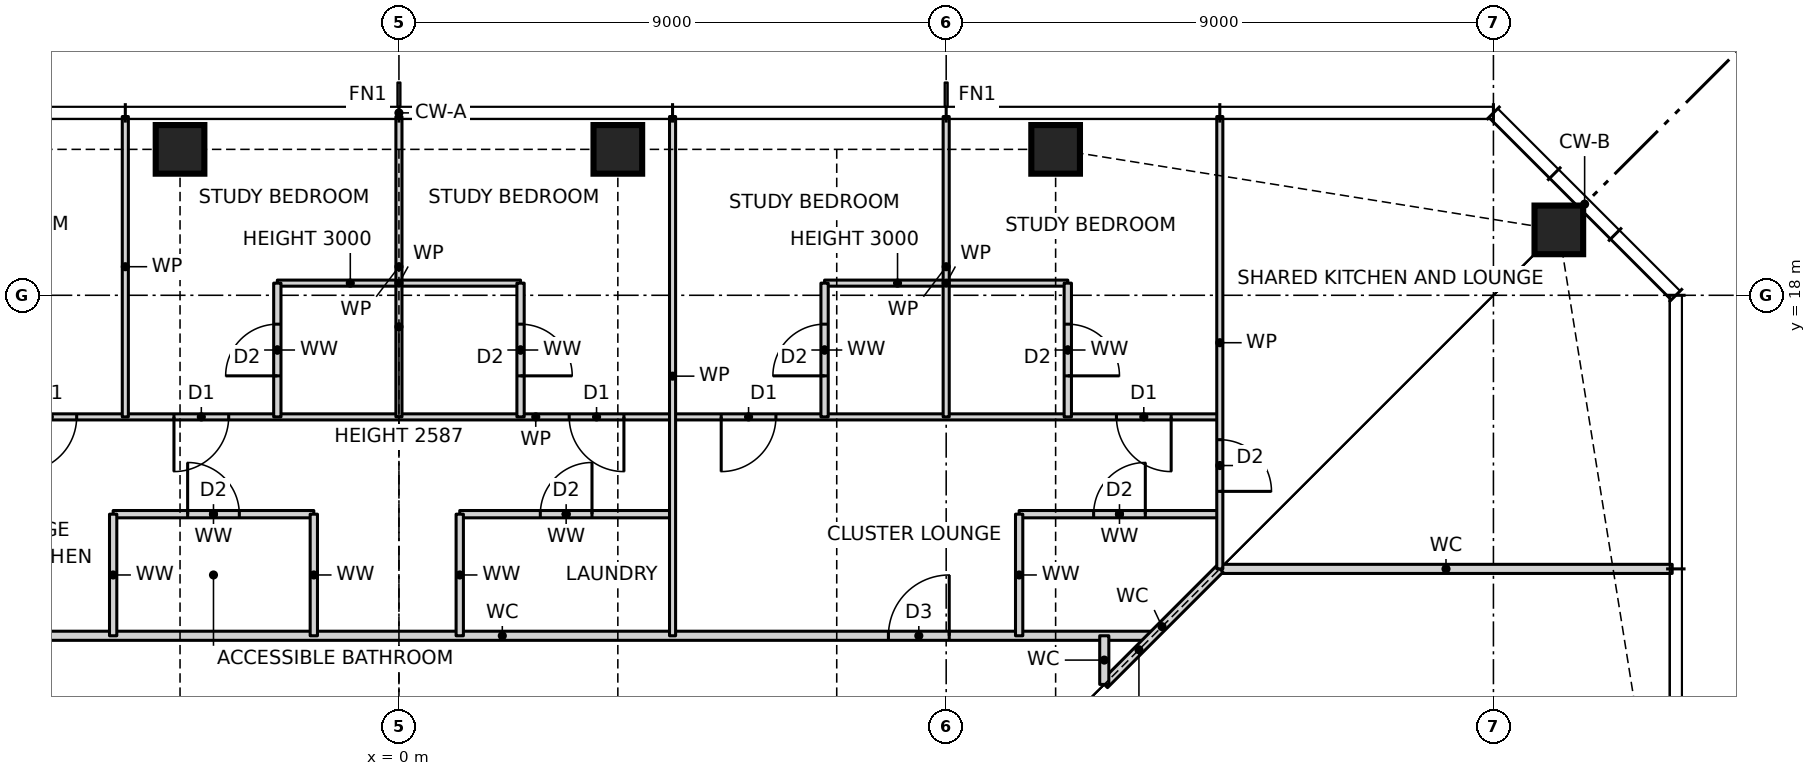
"""IFC4 building model, lengths in metres.
Left out: names, types, materials, properties, quantities, classifications, styles, units other than length and angle.
Written with IfcOpenShell. Run it as: python <this file> out.ifc"""

import sys

from ifc_helpers import new_model, si_unit, direction, frame, frame_2d, origin, origin_2d, place, context, subcontext, project, spatial, rectangle, hollow_rectangle, extrude, element, fill, save


model = new_model("IFC4")
c1 = context("Model", 3, precision=1e-05, world=origin(), true_north=direction((0.0, 1.0)))
c2 = subcontext(c1, "Body", "Model", "MODEL_VIEW")
j1 = project(units=[si_unit("LENGTHUNIT", "METRE"), si_unit("PLANEANGLEUNIT", "RADIAN")], contexts=[c1])
p1 = place(None, origin())
s1 = spatial("IfcSite", under=j1, at=p1, CompositionType="ELEMENT")
p2 = place(p1, origin())
s2 = spatial("IfcBuilding", under=s1, at=p2, CompositionType="ELEMENT")
p3 = place(p2, frame((0.0, 0.0, 122.5)))
s3 = spatial("IfcBuildingStorey", under=s2, at=p3, CompositionType="ELEMENT", Elevation=122.5)
for number, where, z_axis, x_axis in (
    (1, (19.076, 19.076, 0.0), (0.0, 0.0, 1.0), (1.0, 0.0, 0.0)),
    (2, (10.8, 20.4, 0.0), (0.0, 0.0, 1.0), (1.0, 0.0, 0.0)),
    (3, (3.6, 20.4, 0.0), (0.0, 0.0, 1.0), (1.0, 0.0, 0.0)),
    (4, (-3.6, 20.4, 0.0), (0.0, 0.0, 1.0), (1.0, 0.0, 0.0)),
):
    element("IfcColumn", number, at=place(p3, frame(where, z_axis=z_axis, x_axis=x_axis)), inside=s3, PredefinedType="COLUMN", context=c2, shape_type="SweptSolid", body=[
        extrude(hollow_rectangle(XDim=0.8, YDim=0.8, WallThickness=0.07, at=origin_2d()), origin(), (0.0, 0.0, 1.0), 3.5),
    ])
p4 = place(p3, frame((-9.0, 12.4, 0.0), z_axis=(0.0, 0.0, 1.0), x_axis=(1.0, 0.0, 0.0)))
e5 = element("IfcWall", 5, at=p4, inside=s3, PredefinedType="PARTITIONING", context=c2, shape_type="SweptSolid", body=[
    extrude(rectangle(XDim=21.4, YDim=0.15, at=frame_2d((10.7, 0.0))), origin(), (0.0, 0.0, 1.0), 3.27),
])
p5 = place(p4, frame((17.05, 0.0, 0.0)))
e6 = element("IfcOpeningElement", 6, at=p5, cuts=e5, PredefinedType="OPENING", context=c2, shape_type="SweptSolid", body=[
    extrude(rectangle(XDim=1.0, YDim=2.1, at=frame_2d((0.5, 1.05))), frame((0.0, 0.085, 0.0), z_axis=(0.0, -1.0, 0.0), x_axis=(1.0, 0.0, 0.0)), (0.0, 0.0, 1.0), 0.17),
])
p6 = place(p4, frame((1.65, 0.0, 0.0)))
e7 = element("IfcOpeningElement", 7, at=p6, cuts=e5, PredefinedType="OPENING", context=c2, shape_type="SweptSolid", body=[
    extrude(rectangle(XDim=1.0, YDim=2.1, at=frame_2d((0.5, 1.05))), frame((0.0, 0.085, 0.0), z_axis=(0.0, -1.0, 0.0), x_axis=(1.0, 0.0, 0.0)), (0.0, 0.0, 1.0), 0.17),
])
p7 = place(p3, frame((13.5, 13.5, 0.0), z_axis=(0.0, 0.0, 1.0), x_axis=(1.0, 0.0, 0.0)))
e8 = element("IfcWall", 8, at=p7, inside=s3, PredefinedType="PARTITIONING", context=c2, shape_type="SweptSolid", body=[
    extrude(rectangle(XDim=7.44, YDim=0.15, at=frame_2d((3.72, 0.0))), origin(), (0.0, 0.0, 1.0), 3.27),
])
p8 = place(p3, frame((-4.7, 14.4, 0.0), z_axis=(0.0, 0.0, 1.0), x_axis=(1.0, 0.0, 0.0)))
e9 = element("IfcWall", 9, at=p8, inside=s3, PredefinedType="PARTITIONING", context=c2, shape_type="SweptSolid", body=[
    extrude(rectangle(XDim=3.3, YDim=0.12, at=frame_2d((1.65, 0.0))), origin(), (0.0, 0.0, 1.0), 3.27),
])
p9 = place(p8, frame((1.225, 0.0, 0.0)))
e10 = element("IfcOpeningElement", 10, at=p9, cuts=e9, PredefinedType="OPENING", context=c2, shape_type="SweptSolid", body=[
    extrude(rectangle(XDim=0.85, YDim=2.1, at=frame_2d((0.425, 1.05))), frame((0.0, 0.07, 0.0), z_axis=(0.0, -1.0, 0.0), x_axis=(1.0, 0.0, 0.0)), (0.0, 0.0, 1.0), 0.14),
])
p10 = place(p3, frame((1.0, 14.4, 0.0), z_axis=(0.0, 0.0, 1.0), x_axis=(1.0, 0.0, 0.0)))
e11 = element("IfcWall", 11, at=p10, inside=s3, PredefinedType="PARTITIONING", context=c2, shape_type="SweptSolid", body=[
    extrude(rectangle(XDim=3.5, YDim=0.12, at=frame_2d((1.75, 0.0))), origin(), (0.0, 0.0, 1.0), 3.27),
])
p11 = place(p10, frame((1.325, 0.0, 0.0)))
e12 = element("IfcOpeningElement", 12, at=p11, cuts=e11, PredefinedType="OPENING", context=c2, shape_type="SweptSolid", body=[
    extrude(rectangle(XDim=0.85, YDim=2.1, at=frame_2d((0.425, 1.05))), frame((0.0, 0.07, 0.0), z_axis=(0.0, -1.0, 0.0), x_axis=(1.0, 0.0, 0.0)), (0.0, 0.0, 1.0), 0.14),
])
p12 = place(p3, frame((10.2, 14.4, 0.0), z_axis=(0.0, 0.0, 1.0), x_axis=(1.0, 0.0, 0.0)))
e13 = element("IfcWall", 13, at=p12, inside=s3, PredefinedType="PARTITIONING", context=c2, shape_type="SweptSolid", body=[
    extrude(rectangle(XDim=3.3, YDim=0.12, at=frame_2d((1.65, 0.0))), origin(), (0.0, 0.0, 1.0), 3.27),
])
p13 = place(p12, frame((1.225, 0.0, 0.0)))
e14 = element("IfcOpeningElement", 14, at=p13, cuts=e13, PredefinedType="OPENING", context=c2, shape_type="SweptSolid", body=[
    extrude(rectangle(XDim=0.85, YDim=2.1, at=frame_2d((0.425, 1.05))), frame((0.0, 0.07, 0.0), z_axis=(0.0, -1.0, 0.0), x_axis=(1.0, 0.0, 0.0)), (0.0, 0.0, 1.0), 0.14),
])
p14 = place(p3, frame((-9.0, 16.0, 0.0), z_axis=(0.0, 0.0, 1.0), x_axis=(1.0, 0.0, 0.0)))
e15 = element("IfcWall", 15, at=p14, inside=s3, PredefinedType="PARTITIONING", context=c2, shape_type="SweptSolid", body=[
    extrude(rectangle(XDim=22.5, YDim=0.1, at=frame_2d((11.25, 0.0))), origin(), (0.0, 0.0, 1.0), 3.27),
])
p15 = place(p14, frame((20.8, 0.0, 0.0)))
e16 = element("IfcOpeningElement", 16, at=p15, cuts=e15, PredefinedType="OPENING", context=c2, shape_type="SweptSolid", body=[
    extrude(rectangle(XDim=0.9, YDim=2.1, at=frame_2d((0.45, 1.05))), frame((0.0, 0.06, 0.0), z_axis=(0.0, -1.0, 0.0), x_axis=(1.0, 0.0, 0.0)), (0.0, 0.0, 1.0), 0.12),
])
p16 = place(p14, frame((14.3, 0.0, 0.0)))
e17 = element("IfcOpeningElement", 17, at=p16, cuts=e15, PredefinedType="OPENING", context=c2, shape_type="SweptSolid", body=[
    extrude(rectangle(XDim=0.9, YDim=2.1, at=frame_2d((0.45, 1.05))), frame((0.0, 0.06, 0.0), z_axis=(0.0, -1.0, 0.0), x_axis=(1.0, 0.0, 0.0)), (0.0, 0.0, 1.0), 0.12),
])
p17 = place(p14, frame((11.8, 0.0, 0.0)))
e18 = element("IfcOpeningElement", 18, at=p17, cuts=e15, PredefinedType="OPENING", context=c2, shape_type="SweptSolid", body=[
    extrude(rectangle(XDim=0.9, YDim=2.1, at=frame_2d((0.45, 1.05))), frame((0.0, 0.06, 0.0), z_axis=(0.0, -1.0, 0.0), x_axis=(1.0, 0.0, 0.0)), (0.0, 0.0, 1.0), 0.12),
])
p18 = place(p14, frame((5.3, 0.0, 0.0)))
e19 = element("IfcOpeningElement", 19, at=p18, cuts=e15, PredefinedType="OPENING", context=c2, shape_type="SweptSolid", body=[
    extrude(rectangle(XDim=0.9, YDim=2.1, at=frame_2d((0.45, 1.05))), frame((0.0, 0.06, 0.0), z_axis=(0.0, -1.0, 0.0), x_axis=(1.0, 0.0, 0.0)), (0.0, 0.0, 1.0), 0.12),
])
p19 = place(p14, frame((2.8, 0.0, 0.0)))
e20 = element("IfcOpeningElement", 20, at=p19, cuts=e15, PredefinedType="OPENING", context=c2, shape_type="SweptSolid", body=[
    extrude(rectangle(XDim=0.9, YDim=2.1, at=frame_2d((0.45, 1.05))), frame((0.0, 0.06, 0.0), z_axis=(0.0, -1.0, 0.0), x_axis=(1.0, 0.0, 0.0)), (0.0, 0.0, 1.0), 0.12),
])
for number, where, z_axis, x_axis in (
    (21, (-2.0, 18.2, 0.0), (0.0, 0.0, 1.0), (1.0, 0.0, 0.0)),
    (22, (7.0, 18.2, 0.0), (0.0, 0.0, 1.0), (1.0, 0.0, 0.0)),
):
    element("IfcWall", number, at=place(p3, frame(where, z_axis=z_axis, x_axis=x_axis)), inside=s3, PredefinedType="PARTITIONING", context=c2, shape_type="SweptSolid", body=[
        extrude(rectangle(XDim=4.0, YDim=0.1, at=frame_2d((2.0, 0.0))), origin(), (0.0, 0.0, 1.0), 3.0),
    ])
p20 = place(p3, frame((11.6, 11.6, 0.0), z_axis=(0.0, 0.0, 1.0), x_axis=(0.707106781187, 0.707106781187, 0.0)))
e23 = element("IfcWall", 23, at=p20, inside=s3, PredefinedType="PARTITIONING", context=c2, shape_type="SweptSolid", body=[
    extrude(rectangle(XDim=2.687, YDim=0.15, at=frame_2d((1.343, 0.0))), origin(), (0.0, 0.0, 1.0), 2.343),
])
p21 = place(p3, frame((13.5, 13.5, 0.0), z_axis=(0.0, 0.0, 1.0), x_axis=(0.0, 1.0, 0.0)))
e24 = element("IfcWall", 24, at=p21, inside=s3, PredefinedType="PARTITIONING", context=c2, shape_type="SweptSolid", body=[
    extrude(rectangle(XDim=7.44, YDim=0.1, at=frame_2d((3.72, 0.0))), origin(), (0.0, 0.0, 1.0), 3.27),
])
p22 = place(p21, frame((1.275, 0.0, 0.0)))
e25 = element("IfcOpeningElement", 25, at=p22, cuts=e24, PredefinedType="OPENING", context=c2, shape_type="SweptSolid", body=[
    extrude(rectangle(XDim=0.85, YDim=2.1, at=frame_2d((0.425, 1.05))), frame((0.0, 0.06, 0.0), z_axis=(0.0, -1.0, 0.0), x_axis=(1.0, 0.0, 0.0)), (0.0, 0.0, 1.0), 0.12),
])
p23 = place(p3, frame((11.6, 11.6, 0.0), z_axis=(0.0, 0.0, 1.0), x_axis=(0.0, 1.0, 0.0)))
e26 = element("IfcWall", 26, at=p23, inside=s3, PredefinedType="PARTITIONING", context=c2, shape_type="SweptSolid", body=[
    extrude(rectangle(XDim=0.8, YDim=0.15, at=frame_2d((0.4, 0.0))), origin(), (0.0, 0.0, 1.0), 3.27),
])
p24 = place(p3, frame((11.0, 16.0, 0.0), z_axis=(0.0, 0.0, 1.0), x_axis=(0.0, 1.0, 0.0)))
e27 = element("IfcWall", 27, at=p24, inside=s3, PredefinedType="PARTITIONING", context=c2, shape_type="SweptSolid", body=[
    extrude(rectangle(XDim=2.2, YDim=0.12, at=frame_2d((1.1, 0.0))), origin(), (0.0, 0.0, 1.0), 3.27),
])
p25 = place(p24, frame((0.675, 0.0, 0.0)))
e28 = element("IfcOpeningElement", 28, at=p25, cuts=e27, PredefinedType="OPENING", context=c2, shape_type="SweptSolid", body=[
    extrude(rectangle(XDim=0.85, YDim=2.1, at=frame_2d((0.425, 1.05))), frame((0.0, 0.07, 0.0), z_axis=(0.0, -1.0, 0.0), x_axis=(1.0, 0.0, 0.0)), (0.0, 0.0, 1.0), 0.14),
])
p26 = place(p3, frame((10.2, 12.4, 0.0), z_axis=(0.0, 0.0, 1.0), x_axis=(0.0, 1.0, 0.0)))
e29 = element("IfcWall", 29, at=p26, inside=s3, PredefinedType="PARTITIONING", context=c2, shape_type="SweptSolid", body=[
    extrude(rectangle(XDim=2.0, YDim=0.12, at=frame_2d((1.0, 0.0))), origin(), (0.0, 0.0, 1.0), 3.27),
])
p27 = place(p3, frame((9.0, 16.0, 0.0), z_axis=(0.0, 0.0, 1.0), x_axis=(0.0, 1.0, 0.0)))
e30 = element("IfcWall", 30, at=p27, inside=s3, PredefinedType="PARTITIONING", context=c2, shape_type="SweptSolid", body=[
    extrude(rectangle(XDim=4.94, YDim=0.1, at=frame_2d((2.47, 0.0))), origin(), (0.0, 0.0, 1.0), 3.27),
])
p28 = place(p3, frame((7.0, 16.0, 0.0), z_axis=(0.0, 0.0, 1.0), x_axis=(0.0, 1.0, 0.0)))
e31 = element("IfcWall", 31, at=p28, inside=s3, PredefinedType="PARTITIONING", context=c2, shape_type="SweptSolid", body=[
    extrude(rectangle(XDim=2.2, YDim=0.12, at=frame_2d((1.1, 0.0))), origin(), (0.0, 0.0, 1.0), 3.27),
])
p29 = place(p28, frame((0.675, 0.0, 0.0)))
e32 = element("IfcOpeningElement", 32, at=p29, cuts=e31, PredefinedType="OPENING", context=c2, shape_type="SweptSolid", body=[
    extrude(rectangle(XDim=0.85, YDim=2.1, at=frame_2d((0.425, 1.05))), frame((0.0, 0.07, 0.0), z_axis=(0.0, -1.0, 0.0), x_axis=(1.0, 0.0, 0.0)), (0.0, 0.0, 1.0), 0.14),
])
p30 = place(p3, frame((4.5, 12.4, 0.0), z_axis=(0.0, 0.0, 1.0), x_axis=(0.0, 1.0, 0.0)))
e33 = element("IfcWall", 33, at=p30, inside=s3, PredefinedType="PARTITIONING", context=c2, shape_type="SweptSolid", body=[
    extrude(rectangle(XDim=8.54, YDim=0.1, at=frame_2d((4.27, 0.0))), origin(), (0.0, 0.0, 1.0), 3.27),
])
p31 = place(p3, frame((2.0, 16.0, 0.0), z_axis=(0.0, 0.0, 1.0), x_axis=(0.0, 1.0, 0.0)))
e34 = element("IfcWall", 34, at=p31, inside=s3, PredefinedType="PARTITIONING", context=c2, shape_type="SweptSolid", body=[
    extrude(rectangle(XDim=2.2, YDim=0.12, at=frame_2d((1.1, 0.0))), origin(), (0.0, 0.0, 1.0), 3.27),
])
p32 = place(p31, frame((0.675, 0.0, 0.0)))
e35 = element("IfcOpeningElement", 35, at=p32, cuts=e34, PredefinedType="OPENING", context=c2, shape_type="SweptSolid", body=[
    extrude(rectangle(XDim=0.85, YDim=2.1, at=frame_2d((0.425, 1.05))), frame((0.0, 0.07, 0.0), z_axis=(0.0, -1.0, 0.0), x_axis=(1.0, 0.0, 0.0)), (0.0, 0.0, 1.0), 0.14),
])
p33 = place(p3, frame((1.0, 12.4, 0.0), z_axis=(0.0, 0.0, 1.0), x_axis=(0.0, 1.0, 0.0)))
e36 = element("IfcWall", 36, at=p33, inside=s3, PredefinedType="PARTITIONING", context=c2, shape_type="SweptSolid", body=[
    extrude(rectangle(XDim=2.0, YDim=0.12, at=frame_2d((1.0, 0.0))), origin(), (0.0, 0.0, 1.0), 3.27),
])
p34 = place(p3, frame((0.0, 16.0, 0.0), z_axis=(0.0, 0.0, 1.0), x_axis=(0.0, 1.0, 0.0)))
e37 = element("IfcWall", 37, at=p34, inside=s3, PredefinedType="PARTITIONING", context=c2, shape_type="SweptSolid", body=[
    extrude(rectangle(XDim=4.94, YDim=0.1, at=frame_2d((2.47, 0.0))), origin(), (0.0, 0.0, 1.0), 2.587),
])
p35 = place(p3, frame((-1.4, 12.4, 0.0), z_axis=(0.0, 0.0, 1.0), x_axis=(0.0, 1.0, 0.0)))
e38 = element("IfcWall", 38, at=p35, inside=s3, PredefinedType="PARTITIONING", context=c2, shape_type="SweptSolid", body=[
    extrude(rectangle(XDim=2.0, YDim=0.12, at=frame_2d((1.0, 0.0))), origin(), (0.0, 0.0, 1.0), 3.27),
])
p36 = place(p3, frame((-2.0, 16.0, 0.0), z_axis=(0.0, 0.0, 1.0), x_axis=(0.0, 1.0, 0.0)))
e39 = element("IfcWall", 39, at=p36, inside=s3, PredefinedType="PARTITIONING", context=c2, shape_type="SweptSolid", body=[
    extrude(rectangle(XDim=2.2, YDim=0.12, at=frame_2d((1.1, 0.0))), origin(), (0.0, 0.0, 1.0), 3.27),
])
p37 = place(p36, frame((0.675, 0.0, 0.0)))
e40 = element("IfcOpeningElement", 40, at=p37, cuts=e39, PredefinedType="OPENING", context=c2, shape_type="SweptSolid", body=[
    extrude(rectangle(XDim=0.85, YDim=2.1, at=frame_2d((0.425, 1.05))), frame((0.0, 0.07, 0.0), z_axis=(0.0, -1.0, 0.0), x_axis=(1.0, 0.0, 0.0)), (0.0, 0.0, 1.0), 0.14),
])
p38 = place(p3, frame((-4.5, 16.0, 0.0), z_axis=(0.0, 0.0, 1.0), x_axis=(0.0, 1.0, 0.0)))
e41 = element("IfcWall", 41, at=p38, inside=s3, PredefinedType="PARTITIONING", context=c2, shape_type="SweptSolid", body=[
    extrude(rectangle(XDim=4.94, YDim=0.1, at=frame_2d((2.47, 0.0))), origin(), (0.0, 0.0, 1.0), 3.27),
])
p39 = place(p3, frame((-4.7, 12.4, 0.0), z_axis=(0.0, 0.0, 1.0), x_axis=(0.0, 1.0, 0.0)))
e42 = element("IfcWall", 42, at=p39, inside=s3, PredefinedType="PARTITIONING", context=c2, shape_type="SweptSolid", body=[
    extrude(rectangle(XDim=2.0, YDim=0.12, at=frame_2d((1.0, 0.0))), origin(), (0.0, 0.0, 1.0), 3.27),
])
p40 = place(p25, frame((0.85, 0.0, 0.0), z_axis=(0.0, 0.0, 1.0), x_axis=(-1.0, 0.0, 0.0)))
e43 = element("IfcDoor", 43, at=p40, inside=s3, OperationType="SINGLE_SWING_RIGHT", PredefinedType="DOOR", context=c2, shape_type="SweptSolid", body=[
    extrude(rectangle(XDim=0.85, YDim=2.1, at=frame_2d((0.425, 1.05))), frame((0.0, 0.025, 0.0), z_axis=(0.0, -1.0, 0.0), x_axis=(1.0, 0.0, 0.0)), (0.0, 0.0, 1.0), 0.05),
])
fill(e28, e43)
p41 = place(p15, frame((0.9, 0.0, 0.0), z_axis=(0.0, 0.0, 1.0), x_axis=(-1.0, 0.0, 0.0)))
e44 = element("IfcDoor", 44, at=p41, inside=s3, OperationType="SINGLE_SWING_LEFT", PredefinedType="DOOR", context=c2, shape_type="SweptSolid", body=[
    extrude(rectangle(XDim=0.9, YDim=2.1, at=frame_2d((0.45, 1.05))), frame((0.0, 0.025, 0.0), z_axis=(0.0, -1.0, 0.0), x_axis=(1.0, 0.0, 0.0)), (0.0, 0.0, 1.0), 0.05),
])
fill(e16, e44)
p42 = place(p29, origin())
e45 = element("IfcDoor", 45, at=p42, inside=s3, OperationType="SINGLE_SWING_LEFT", PredefinedType="DOOR", context=c2, shape_type="SweptSolid", body=[
    extrude(rectangle(XDim=0.85, YDim=2.1, at=frame_2d((0.425, 1.05))), frame((0.0, 0.025, 0.0), z_axis=(0.0, -1.0, 0.0), x_axis=(1.0, 0.0, 0.0)), (0.0, 0.0, 1.0), 0.05),
])
fill(e32, e45)
p43 = place(p16, frame((0.9, 0.0, 0.0), z_axis=(0.0, 0.0, 1.0), x_axis=(-1.0, 0.0, 0.0)))
e46 = element("IfcDoor", 46, at=p43, inside=s3, OperationType="SINGLE_SWING_RIGHT", PredefinedType="DOOR", context=c2, shape_type="SweptSolid", body=[
    extrude(rectangle(XDim=0.9, YDim=2.1, at=frame_2d((0.45, 1.05))), frame((0.0, 0.025, 0.0), z_axis=(0.0, -1.0, 0.0), x_axis=(1.0, 0.0, 0.0)), (0.0, 0.0, 1.0), 0.05),
])
fill(e17, e46)
p44 = place(p5, origin())
e47 = element("IfcDoor", 47, at=p44, inside=s3, OperationType="SINGLE_SWING_RIGHT", PredefinedType="DOOR", context=c2, shape_type="SweptSolid", body=[
    extrude(rectangle(XDim=1.0, YDim=2.1, at=frame_2d((0.5, 1.05))), frame((0.0, 0.025, 0.0), z_axis=(0.0, -1.0, 0.0), x_axis=(1.0, 0.0, 0.0)), (0.0, 0.0, 1.0), 0.05),
])
fill(e6, e47)
p45 = place(p13, origin())
e48 = element("IfcDoor", 48, at=p45, inside=s3, OperationType="SINGLE_SWING_RIGHT", PredefinedType="DOOR", context=c2, shape_type="SweptSolid", body=[
    extrude(rectangle(XDim=0.85, YDim=2.1, at=frame_2d((0.425, 1.05))), frame((0.0, 0.025, 0.0), z_axis=(0.0, -1.0, 0.0), x_axis=(1.0, 0.0, 0.0)), (0.0, 0.0, 1.0), 0.05),
])
fill(e14, e48)
p46 = place(p32, frame((0.85, 0.0, 0.0), z_axis=(0.0, 0.0, 1.0), x_axis=(-1.0, 0.0, 0.0)))
e49 = element("IfcDoor", 49, at=p46, inside=s3, OperationType="SINGLE_SWING_RIGHT", PredefinedType="DOOR", context=c2, shape_type="SweptSolid", body=[
    extrude(rectangle(XDim=0.85, YDim=2.1, at=frame_2d((0.425, 1.05))), frame((0.0, 0.025, 0.0), z_axis=(0.0, -1.0, 0.0), x_axis=(1.0, 0.0, 0.0)), (0.0, 0.0, 1.0), 0.05),
])
fill(e35, e49)
p47 = place(p17, frame((0.9, 0.0, 0.0), z_axis=(0.0, 0.0, 1.0), x_axis=(-1.0, 0.0, 0.0)))
e50 = element("IfcDoor", 50, at=p47, inside=s3, OperationType="SINGLE_SWING_LEFT", PredefinedType="DOOR", context=c2, shape_type="SweptSolid", body=[
    extrude(rectangle(XDim=0.9, YDim=2.1, at=frame_2d((0.45, 1.05))), frame((0.0, 0.025, 0.0), z_axis=(0.0, -1.0, 0.0), x_axis=(1.0, 0.0, 0.0)), (0.0, 0.0, 1.0), 0.05),
])
fill(e18, e50)
p48 = place(p37, origin())
e51 = element("IfcDoor", 51, at=p48, inside=s3, OperationType="SINGLE_SWING_LEFT", PredefinedType="DOOR", context=c2, shape_type="SweptSolid", body=[
    extrude(rectangle(XDim=0.85, YDim=2.1, at=frame_2d((0.425, 1.05))), frame((0.0, 0.025, 0.0), z_axis=(0.0, -1.0, 0.0), x_axis=(1.0, 0.0, 0.0)), (0.0, 0.0, 1.0), 0.05),
])
fill(e40, e51)
p49 = place(p18, frame((0.9, 0.0, 0.0), z_axis=(0.0, 0.0, 1.0), x_axis=(-1.0, 0.0, 0.0)))
e52 = element("IfcDoor", 52, at=p49, inside=s3, OperationType="SINGLE_SWING_RIGHT", PredefinedType="DOOR", context=c2, shape_type="SweptSolid", body=[
    extrude(rectangle(XDim=0.9, YDim=2.1, at=frame_2d((0.45, 1.05))), frame((0.0, 0.025, 0.0), z_axis=(0.0, -1.0, 0.0), x_axis=(1.0, 0.0, 0.0)), (0.0, 0.0, 1.0), 0.05),
])
fill(e19, e52)
p50 = place(p19, frame((0.9, 0.0, 0.0), z_axis=(0.0, 0.0, 1.0), x_axis=(-1.0, 0.0, 0.0)))
e53 = element("IfcDoor", 53, at=p50, inside=s3, OperationType="SINGLE_SWING_RIGHT", PredefinedType="DOOR", context=c2, shape_type="SweptSolid", body=[
    extrude(rectangle(XDim=0.9, YDim=2.1, at=frame_2d((0.45, 1.05))), frame((0.0, 0.025, 0.0), z_axis=(0.0, -1.0, 0.0), x_axis=(1.0, 0.0, 0.0)), (0.0, 0.0, 1.0), 0.05),
])
fill(e20, e53)
p51 = place(p11, origin())
e54 = element("IfcDoor", 54, at=p51, inside=s3, OperationType="SINGLE_SWING_RIGHT", PredefinedType="DOOR", context=c2, shape_type="SweptSolid", body=[
    extrude(rectangle(XDim=0.85, YDim=2.1, at=frame_2d((0.425, 1.05))), frame((0.0, 0.025, 0.0), z_axis=(0.0, -1.0, 0.0), x_axis=(1.0, 0.0, 0.0)), (0.0, 0.0, 1.0), 0.05),
])
fill(e12, e54)
p52 = place(p9, origin())
e55 = element("IfcDoor", 55, at=p52, inside=s3, OperationType="SINGLE_SWING_LEFT", PredefinedType="DOOR", context=c2, shape_type="SweptSolid", body=[
    extrude(rectangle(XDim=0.85, YDim=2.1, at=frame_2d((0.425, 1.05))), frame((0.0, 0.025, 0.0), z_axis=(0.0, -1.0, 0.0), x_axis=(1.0, 0.0, 0.0)), (0.0, 0.0, 1.0), 0.05),
])
fill(e10, e55)
p53 = place(p22, frame((0.85, 0.0, 0.0), z_axis=(0.0, 0.0, 1.0), x_axis=(-1.0, 0.0, 0.0)))
e56 = element("IfcDoor", 56, at=p53, inside=s3, OperationType="SINGLE_SWING_RIGHT", PredefinedType="DOOR", context=c2, shape_type="SweptSolid", body=[
    extrude(rectangle(XDim=0.85, YDim=2.1, at=frame_2d((0.425, 1.05))), frame((0.0, 0.025, 0.0), z_axis=(0.0, -1.0, 0.0), x_axis=(1.0, 0.0, 0.0)), (0.0, 0.0, 1.0), 0.05),
])
fill(e25, e56)
save(model, sys.argv[1])
